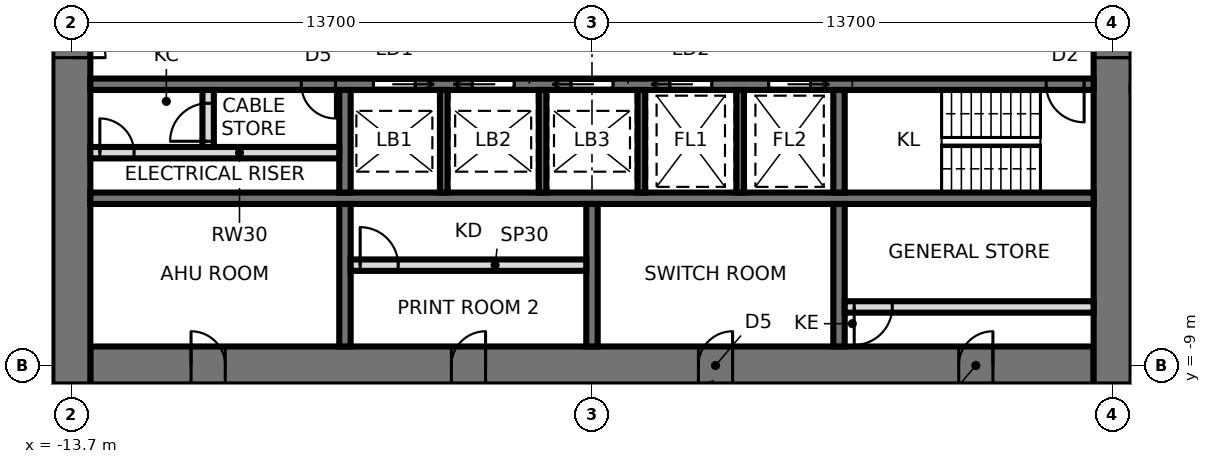
"""IFC4 building model, lengths in metres.
Left out: names, types, materials, properties, quantities, classifications, styles, units other than length and angle.
Written with IfcOpenShell. Run it as: python <this file> out.ifc"""

import sys

from ifc_helpers import new_model, si_unit, direction, frame, frame_2d, origin, place, context, subcontext, project, spatial, rectangle, extrude, element, fill, save


model = new_model("IFC4")
c1 = context("Model", 3, precision=1e-05, world=origin(), true_north=direction((0.0, 1.0)))
c2 = subcontext(c1, "Body", "Model", "MODEL_VIEW")
j1 = project(units=[si_unit("LENGTHUNIT", "METRE"), si_unit("PLANEANGLEUNIT", "RADIAN")], contexts=[c1])
p1 = place(None, origin())
s1 = spatial("IfcSite", under=j1, at=p1, CompositionType="ELEMENT")
p2 = place(p1, origin())
s2 = spatial("IfcBuilding", under=s1, at=p2, CompositionType="ELEMENT")
p3 = place(p2, frame((0.0, 0.0, 96.3)))
s3 = spatial("IfcBuildingStorey", under=s2, at=p3, CompositionType="ELEMENT", Elevation=96.3)
p4 = place(p3, frame((-13.2, -9.0, 0.0), z_axis=(0.0, 0.0, 1.0), x_axis=(1.0, 0.0, 0.0)))
e1 = element("IfcWall", 1, at=p4, inside=s3, PredefinedType="SHEAR", context=c2, shape_type="SweptSolid", body=[
    extrude(rectangle(XDim=26.4, YDim=1.0, at=frame_2d((13.2, 0.0))), origin(), (0.0, 0.0, 1.0), 3.9),
])
p5 = place(p4, frame((2.65, 0.0, 0.0)))
e2 = element("IfcOpeningElement", 2, at=p5, cuts=e1, PredefinedType="OPENING", context=c2, shape_type="SweptSolid", body=[
    extrude(rectangle(XDim=0.9, YDim=2.1, at=frame_2d((0.45, 1.05))), frame((0.0, 0.51, 0.0), z_axis=(0.0, -1.0, 0.0), x_axis=(1.0, 0.0, 0.0)), (0.0, 0.0, 1.0), 1.02),
])
p6 = place(p4, frame((9.5, 0.0, 0.0)))
e3 = element("IfcOpeningElement", 3, at=p6, cuts=e1, PredefinedType="OPENING", context=c2, shape_type="SweptSolid", body=[
    extrude(rectangle(XDim=0.9, YDim=2.1, at=frame_2d((0.45, 1.05))), frame((0.0, 0.51, 0.0), z_axis=(0.0, -1.0, 0.0), x_axis=(1.0, 0.0, 0.0)), (0.0, 0.0, 1.0), 1.02),
])
p7 = place(p4, frame((16.0, 0.0, 0.0)))
e4 = element("IfcOpeningElement", 4, at=p7, cuts=e1, PredefinedType="OPENING", context=c2, shape_type="SweptSolid", body=[
    extrude(rectangle(XDim=0.9, YDim=2.1, at=frame_2d((0.45, 1.05))), frame((0.0, 0.51, 0.0), z_axis=(0.0, -1.0, 0.0), x_axis=(1.0, 0.0, 0.0)), (0.0, 0.0, 1.0), 1.02),
])
p8 = place(p4, frame((22.85, 0.0, 0.0)))
e5 = element("IfcOpeningElement", 5, at=p8, cuts=e1, PredefinedType="OPENING", context=c2, shape_type="SweptSolid", body=[
    extrude(rectangle(XDim=0.9, YDim=2.1, at=frame_2d((0.45, 1.05))), frame((0.0, 0.51, 0.0), z_axis=(0.0, -1.0, 0.0), x_axis=(1.0, 0.0, 0.0)), (0.0, 0.0, 1.0), 1.02),
])
p9 = place(p3, frame((13.7, -9.5, 0.0), z_axis=(0.0, 0.0, 1.0), x_axis=(0.0, 1.0, 0.0)))
e6 = element("IfcWall", 6, at=p9, inside=s3, PredefinedType="SHEAR", context=c2, shape_type="SweptSolid", body=[
    extrude(rectangle(XDim=19.0, YDim=1.0, at=frame_2d((9.5, 0.0))), origin(), (0.0, 0.0, 1.0), 3.9),
])
p10 = place(p9, frame((8.6, 0.0, 0.0)))
e7 = element("IfcOpeningElement", 7, at=p10, cuts=e6, PredefinedType="OPENING", context=c2, shape_type="SweptSolid", body=[
    extrude(rectangle(XDim=1.8, YDim=2.4, at=frame_2d((0.9, 1.2))), frame((0.0, 0.51, 0.0), z_axis=(0.0, -1.0, 0.0), x_axis=(1.0, 0.0, 0.0)), (0.0, 0.0, 1.0), 1.02),
])
p11 = place(p3, frame((-13.7, 9.5, 0.0), z_axis=(0.0, 0.0, 1.0), x_axis=(0.0, -1.0, 0.0)))
e8 = element("IfcWall", 8, at=p11, inside=s3, PredefinedType="SHEAR", context=c2, shape_type="SweptSolid", body=[
    extrude(rectangle(XDim=19.0, YDim=1.0, at=frame_2d((9.5, 0.0))), origin(), (0.0, 0.0, 1.0), 3.9),
])
p12 = place(p11, frame((8.6, 0.0, 0.0)))
e9 = element("IfcOpeningElement", 9, at=p12, cuts=e8, PredefinedType="OPENING", context=c2, shape_type="SweptSolid", body=[
    extrude(rectangle(XDim=1.8, YDim=2.4, at=frame_2d((0.9, 1.2))), frame((0.0, 0.51, 0.0), z_axis=(0.0, -1.0, 0.0), x_axis=(1.0, 0.0, 0.0)), (0.0, 0.0, 1.0), 1.02),
])
p13 = place(p3, frame((-13.2, -1.6, 0.0), z_axis=(0.0, 0.0, 1.0), x_axis=(1.0, 0.0, 0.0)))
e10 = element("IfcWall", 10, at=p13, inside=s3, PredefinedType="SHEAR", context=c2, shape_type="SweptSolid", body=[
    extrude(rectangle(XDim=26.4, YDim=0.3, at=frame_2d((13.2, 0.0))), origin(), (0.0, 0.0, 1.0), 3.9),
])
p14 = place(p13, frame((25.15, 0.0, 0.0)))
e11 = element("IfcOpeningElement", 11, at=p14, cuts=e10, PredefinedType="OPENING", context=c2, shape_type="SweptSolid", body=[
    extrude(rectangle(XDim=1.0, YDim=2.1, at=frame_2d((0.5, 1.05))), frame((0.0, 0.16, 0.0), z_axis=(0.0, -1.0, 0.0), x_axis=(1.0, 0.0, 0.0)), (0.0, 0.0, 1.0), 0.32),
])
p15 = place(p13, frame((7.45, 0.0, 0.0)))
e12 = element("IfcOpeningElement", 12, at=p15, cuts=e10, PredefinedType="OPENING", context=c2, shape_type="SweptSolid", body=[
    extrude(rectangle(XDim=1.1, YDim=2.3, at=frame_2d((0.55, 1.15))), frame((0.0, 0.16, 0.0), z_axis=(0.0, -1.0, 0.0), x_axis=(1.0, 0.0, 0.0)), (0.0, 0.0, 1.0), 0.32),
])
p16 = place(p13, frame((10.05, 0.0, 0.0)))
e13 = element("IfcOpeningElement", 13, at=p16, cuts=e10, PredefinedType="OPENING", context=c2, shape_type="SweptSolid", body=[
    extrude(rectangle(XDim=1.1, YDim=2.3, at=frame_2d((0.55, 1.15))), frame((0.0, 0.16, 0.0), z_axis=(0.0, -1.0, 0.0), x_axis=(1.0, 0.0, 0.0)), (0.0, 0.0, 1.0), 0.32),
])
p17 = place(p13, frame((12.65, 0.0, 0.0)))
e14 = element("IfcOpeningElement", 14, at=p17, cuts=e10, PredefinedType="OPENING", context=c2, shape_type="SweptSolid", body=[
    extrude(rectangle(XDim=1.1, YDim=2.3, at=frame_2d((0.55, 1.15))), frame((0.0, 0.16, 0.0), z_axis=(0.0, -1.0, 0.0), x_axis=(1.0, 0.0, 0.0)), (0.0, 0.0, 1.0), 0.32),
])
p18 = place(p13, frame((15.25, 0.0, 0.0)))
e15 = element("IfcOpeningElement", 15, at=p18, cuts=e10, PredefinedType="OPENING", context=c2, shape_type="SweptSolid", body=[
    extrude(rectangle(XDim=1.1, YDim=2.3, at=frame_2d((0.55, 1.15))), frame((0.0, 0.16, 0.0), z_axis=(0.0, -1.0, 0.0), x_axis=(1.0, 0.0, 0.0)), (0.0, 0.0, 1.0), 0.32),
])
p19 = place(p13, frame((17.85, 0.0, 0.0)))
e16 = element("IfcOpeningElement", 16, at=p19, cuts=e10, PredefinedType="OPENING", context=c2, shape_type="SweptSolid", body=[
    extrude(rectangle(XDim=1.1, YDim=2.3, at=frame_2d((0.55, 1.15))), frame((0.0, 0.16, 0.0), z_axis=(0.0, -1.0, 0.0), x_axis=(1.0, 0.0, 0.0)), (0.0, 0.0, 1.0), 0.32),
])
p20 = place(p13, frame((5.55, 0.0, 0.0)))
e17 = element("IfcOpeningElement", 17, at=p20, cuts=e10, PredefinedType="OPENING", context=c2, shape_type="SweptSolid", body=[
    extrude(rectangle(XDim=0.9, YDim=2.1, at=frame_2d((0.45, 1.05))), frame((0.0, 0.16, 0.0), z_axis=(0.0, -1.0, 0.0), x_axis=(1.0, 0.0, 0.0)), (0.0, 0.0, 1.0), 0.32),
])
p21 = place(p3, frame((-13.2, -4.6, 0.0), z_axis=(0.0, 0.0, 1.0), x_axis=(1.0, 0.0, 0.0)))
e18 = element("IfcWall", 18, at=p21, inside=s3, PredefinedType="SHEAR", context=c2, shape_type="SweptSolid", body=[
    extrude(rectangle(XDim=26.4, YDim=0.3, at=frame_2d((13.2, 0.0))), origin(), (0.0, 0.0, 1.0), 3.9),
])
p22 = place(p3, frame((-6.5, -1.75, 0.0), z_axis=(0.0, 0.0, 1.0), x_axis=(0.0, -1.0, 0.0)))
e19 = element("IfcWall", 19, at=p22, inside=s3, PredefinedType="SHEAR", context=c2, shape_type="SweptSolid", body=[
    extrude(rectangle(XDim=2.7, YDim=0.3, at=frame_2d((1.35, 0.0))), origin(), (0.0, 0.0, 1.0), 3.9),
])
p23 = place(p3, frame((-6.5, -4.75, 0.0), z_axis=(0.0, 0.0, 1.0), x_axis=(0.0, -1.0, 0.0)))
e20 = element("IfcWall", 20, at=p23, inside=s3, PredefinedType="SHEAR", context=c2, shape_type="SweptSolid", body=[
    extrude(rectangle(XDim=3.75, YDim=0.3, at=frame_2d((1.875, 0.0))), origin(), (0.0, 0.0, 1.0), 3.9),
])
p24 = place(p3, frame((6.5, -1.75, 0.0), z_axis=(0.0, 0.0, 1.0), x_axis=(0.0, -1.0, 0.0)))
e21 = element("IfcWall", 21, at=p24, inside=s3, PredefinedType="SHEAR", context=c2, shape_type="SweptSolid", body=[
    extrude(rectangle(XDim=2.7, YDim=0.3, at=frame_2d((1.35, 0.0))), origin(), (0.0, 0.0, 1.0), 3.9),
])
p25 = place(p3, frame((6.5, -4.75, 0.0), z_axis=(0.0, 0.0, 1.0), x_axis=(0.0, -1.0, 0.0)))
e22 = element("IfcWall", 22, at=p25, inside=s3, PredefinedType="SHEAR", context=c2, shape_type="SweptSolid", body=[
    extrude(rectangle(XDim=3.75, YDim=0.3, at=frame_2d((1.875, 0.0))), origin(), (0.0, 0.0, 1.0), 3.9),
])
for number, where, z_axis, x_axis in (
    (23, (-3.9, -1.75, 0.0), (0.0, 0.0, 1.0), (0.0, -1.0, 0.0)),
    (24, (-1.3, -1.75, 0.0), (0.0, 0.0, 1.0), (0.0, -1.0, 0.0)),
    (25, (1.3, -1.75, 0.0), (0.0, 0.0, 1.0), (0.0, -1.0, 0.0)),
    (26, (3.9, -1.75, 0.0), (0.0, 0.0, 1.0), (0.0, -1.0, 0.0)),
):
    element("IfcWall", number, at=place(p3, frame(where, z_axis=z_axis, x_axis=x_axis)), inside=s3, PredefinedType="SHEAR", context=c2, shape_type="SweptSolid", body=[
        extrude(rectangle(XDim=2.7, YDim=0.2, at=frame_2d((1.35, 0.0))), origin(), (0.0, 0.0, 1.0), 3.9),
    ])
p26 = place(p3, frame((0.0, -4.75, 0.0), z_axis=(0.0, 0.0, 1.0), x_axis=(0.0, -1.0, 0.0)))
e27 = element("IfcWall", 27, at=p26, inside=s3, PredefinedType="SHEAR", context=c2, shape_type="SweptSolid", body=[
    extrude(rectangle(XDim=3.75, YDim=0.3, at=frame_2d((1.875, 0.0))), origin(), (0.0, 0.0, 1.0), 3.9),
])
p27 = place(p3, frame((-6.35, -6.36, 0.0), z_axis=(0.0, 0.0, 1.0), x_axis=(1.0, 0.0, 0.0)))
e28 = element("IfcWall", 28, at=p27, inside=s3, PredefinedType="PARTITIONING", context=c2, shape_type="SweptSolid", body=[
    extrude(rectangle(XDim=6.2, YDim=0.3, at=frame_2d((3.1, 0.0))), origin(), (0.0, 0.0, 1.0), 3.74),
])
p28 = place(p27, frame((0.25, 0.0, 0.0)))
e29 = element("IfcOpeningElement", 29, at=p28, cuts=e28, PredefinedType="OPENING", context=c2, shape_type="SweptSolid", body=[
    extrude(rectangle(XDim=1.0, YDim=2.4, at=frame_2d((0.5, 1.2))), frame((0.0, 0.16, 0.0), z_axis=(0.0, -1.0, 0.0), x_axis=(1.0, 0.0, 0.0)), (0.0, 0.0, 1.0), 0.32),
])
p29 = place(p3, frame((6.65, -7.46, 0.0), z_axis=(0.0, 0.0, 1.0), x_axis=(1.0, 0.0, 0.0)))
e30 = element("IfcWall", 30, at=p29, inside=s3, PredefinedType="PARTITIONING", context=c2, shape_type="SweptSolid", body=[
    extrude(rectangle(XDim=6.55, YDim=0.3, at=frame_2d((3.275, 0.0))), origin(), (0.0, 0.0, 1.0), 3.74),
])
p30 = place(p29, frame((0.25, 0.0, 0.0)))
e31 = element("IfcOpeningElement", 31, at=p30, cuts=e30, PredefinedType="OPENING", context=c2, shape_type="SweptSolid", body=[
    extrude(rectangle(XDim=1.0, YDim=2.4, at=frame_2d((0.5, 1.2))), frame((0.0, 0.16, 0.0), z_axis=(0.0, -1.0, 0.0), x_axis=(1.0, 0.0, 0.0)), (0.0, 0.0, 1.0), 0.32),
])
p31 = place(p3, frame((-13.2, -3.4, 0.0), z_axis=(0.0, 0.0, 1.0), x_axis=(1.0, 0.0, 0.0)))
e32 = element("IfcWall", 32, at=p31, inside=s3, PredefinedType="SOLIDWALL", context=c2, shape_type="SweptSolid", body=[
    extrude(rectangle(XDim=6.55, YDim=0.3, at=frame_2d((3.275, 0.0))), origin(), (0.0, 0.0, 1.0), 3.74),
])
p32 = place(p31, frame((0.25, 0.0, 0.0)))
e33 = element("IfcOpeningElement", 33, at=p32, cuts=e32, PredefinedType="OPENING", context=c2, shape_type="SweptSolid", body=[
    extrude(rectangle(XDim=0.9, YDim=2.1, at=frame_2d((0.45, 1.05))), frame((0.0, 0.16, 0.0), z_axis=(0.0, -1.0, 0.0), x_axis=(1.0, 0.0, 0.0)), (0.0, 0.0, 1.0), 0.32),
])
p33 = place(p3, frame((-10.1, -3.25, 0.0), z_axis=(0.0, 0.0, 1.0), x_axis=(0.0, 1.0, 0.0)))
e34 = element("IfcWall", 34, at=p33, inside=s3, PredefinedType="PARTITIONING", context=c2, shape_type="SweptSolid", body=[
    extrude(rectangle(XDim=1.5, YDim=0.3, at=frame_2d((0.75, 0.0))), origin(), (0.0, 0.0, 1.0), 3.74),
])
p34 = place(p33, frame((0.15, 0.0, 0.0)))
e35 = element("IfcOpeningElement", 35, at=p34, cuts=e34, PredefinedType="OPENING", context=c2, shape_type="SweptSolid", body=[
    extrude(rectangle(XDim=1.0, YDim=2.4, at=frame_2d((0.5, 1.2))), frame((0.0, 0.16, 0.0), z_axis=(0.0, -1.0, 0.0), x_axis=(1.0, 0.0, 0.0)), (0.0, 0.0, 1.0), 0.32),
])
p35 = place(p3, frame((3.672, -11.3, 0.0), z_axis=(0.0, 0.0, 1.0), x_axis=(-0.309059822154, 0.95104259964, 0.0)))
e36 = element("IfcWall", 36, at=p35, inside=s3, PredefinedType="PARTITIONING", context=c2, shape_type="SweptSolid", body=[
    extrude(rectangle(XDim=1.893, YDim=0.12, at=frame_2d((0.946, 0.0))), origin(), (0.0, 0.0, 1.0), 2.94),
])
p36 = place(p12, origin())
e37 = element("IfcDoor", 37, at=p36, inside=s3, OperationType="DOUBLE_DOOR_SINGLE_SWING", PredefinedType="DOOR", context=c2, shape_type="SweptSolid", body=[
    extrude(rectangle(XDim=1.72, YDim=2.36, at=frame_2d((0.9, 1.18))), frame((0.0, 0.025, 0.0), z_axis=(0.0, -1.0, 0.0), x_axis=(1.0, 0.0, 0.0)), (0.0, 0.0, 1.0), 0.05),
    extrude(rectangle(XDim=0.04, YDim=2.4, at=frame_2d((0.02, 1.2))), frame((0.0, 0.25, 0.0), z_axis=(0.0, -1.0, 0.0), x_axis=(1.0, 0.0, 0.0)), (0.0, 0.0, 1.0), 0.5),
    extrude(rectangle(XDim=0.04, YDim=2.4, at=frame_2d((1.78, 1.2))), frame((0.0, 0.25, 0.0), z_axis=(0.0, -1.0, 0.0), x_axis=(1.0, 0.0, 0.0)), (0.0, 0.0, 1.0), 0.5),
    extrude(rectangle(XDim=1.72, YDim=0.04, at=frame_2d((0.9, 2.38))), frame((0.0, 0.25, 0.0), z_axis=(0.0, -1.0, 0.0), x_axis=(1.0, 0.0, 0.0)), (0.0, 0.0, 1.0), 0.5),
])
fill(e9, e37)
p37 = place(p10, frame((1.8, 0.0, 0.0), z_axis=(0.0, 0.0, 1.0), x_axis=(-1.0, 0.0, 0.0)))
e38 = element("IfcDoor", 38, at=p37, inside=s3, OperationType="DOUBLE_DOOR_SINGLE_SWING", PredefinedType="DOOR", context=c2, shape_type="SweptSolid", body=[
    extrude(rectangle(XDim=1.72, YDim=2.36, at=frame_2d((0.9, 1.18))), frame((0.0, 0.025, 0.0), z_axis=(0.0, -1.0, 0.0), x_axis=(1.0, 0.0, 0.0)), (0.0, 0.0, 1.0), 0.05),
    extrude(rectangle(XDim=0.04, YDim=2.4, at=frame_2d((1.78, 1.2))), frame((0.0, 0.25, 0.0), z_axis=(0.0, -1.0, 0.0), x_axis=(1.0, 0.0, 0.0)), (0.0, 0.0, 1.0), 0.5),
    extrude(rectangle(XDim=0.04, YDim=2.4, at=frame_2d((0.02, 1.2))), frame((0.0, 0.25, 0.0), z_axis=(0.0, -1.0, 0.0), x_axis=(1.0, 0.0, 0.0)), (0.0, 0.0, 1.0), 0.5),
    extrude(rectangle(XDim=1.72, YDim=0.04, at=frame_2d((0.9, 2.38))), frame((0.0, 0.25, 0.0), z_axis=(0.0, -1.0, 0.0), x_axis=(1.0, 0.0, 0.0)), (0.0, 0.0, 1.0), 0.5),
])
fill(e7, e38)
p38 = place(p14, frame((1.0, 0.0, 0.0), z_axis=(0.0, 0.0, 1.0), x_axis=(-1.0, 0.0, 0.0)))
e39 = element("IfcDoor", 39, at=p38, inside=s3, OperationType="SINGLE_SWING_LEFT", PredefinedType="DOOR", context=c2, shape_type="SweptSolid", body=[
    extrude(rectangle(XDim=1.0, YDim=2.1, at=frame_2d((0.5, 1.05))), frame((0.0, 0.025, 0.0), z_axis=(0.0, -1.0, 0.0), x_axis=(1.0, 0.0, 0.0)), (0.0, 0.0, 1.0), 0.05),
])
fill(e11, e39)
p39 = place(p15, frame((1.1, 0.0, 0.0), z_axis=(0.0, 0.0, 1.0), x_axis=(-1.0, 0.0, 0.0)))
e40 = element("IfcDoor", 40, at=p39, inside=s3, OperationType="SLIDING_TO_LEFT", PredefinedType="DOOR", context=c2, shape_type="SweptSolid", body=[
    extrude(rectangle(XDim=1.1, YDim=2.3, at=frame_2d((0.55, 1.15))), frame((0.0, 0.025, 0.0), z_axis=(0.0, -1.0, 0.0), x_axis=(1.0, 0.0, 0.0)), (0.0, 0.0, 1.0), 0.05),
])
fill(e12, e40)
p40 = place(p16, frame((1.1, 0.0, 0.0), z_axis=(0.0, 0.0, 1.0), x_axis=(-1.0, 0.0, 0.0)))
e41 = element("IfcDoor", 41, at=p40, inside=s3, OperationType="SLIDING_TO_RIGHT", PredefinedType="DOOR", context=c2, shape_type="SweptSolid", body=[
    extrude(rectangle(XDim=1.1, YDim=2.3, at=frame_2d((0.55, 1.15))), frame((0.0, 0.025, 0.0), z_axis=(0.0, -1.0, 0.0), x_axis=(1.0, 0.0, 0.0)), (0.0, 0.0, 1.0), 0.05),
])
fill(e13, e41)
p41 = place(p17, frame((1.1, 0.0, 0.0), z_axis=(0.0, 0.0, 1.0), x_axis=(-1.0, 0.0, 0.0)))
e42 = element("IfcDoor", 42, at=p41, inside=s3, OperationType="SLIDING_TO_RIGHT", PredefinedType="DOOR", context=c2, shape_type="SweptSolid", body=[
    extrude(rectangle(XDim=1.1, YDim=2.3, at=frame_2d((0.55, 1.15))), frame((0.0, 0.025, 0.0), z_axis=(0.0, -1.0, 0.0), x_axis=(1.0, 0.0, 0.0)), (0.0, 0.0, 1.0), 0.05),
])
fill(e14, e42)
p42 = place(p18, frame((1.1, 0.0, 0.0), z_axis=(0.0, 0.0, 1.0), x_axis=(-1.0, 0.0, 0.0)))
e43 = element("IfcDoor", 43, at=p42, inside=s3, OperationType="SLIDING_TO_RIGHT", PredefinedType="DOOR", context=c2, shape_type="SweptSolid", body=[
    extrude(rectangle(XDim=1.1, YDim=2.3, at=frame_2d((0.55, 1.15))), frame((0.0, 0.025, 0.0), z_axis=(0.0, -1.0, 0.0), x_axis=(1.0, 0.0, 0.0)), (0.0, 0.0, 1.0), 0.05),
])
fill(e15, e43)
p43 = place(p19, frame((1.1, 0.0, 0.0), z_axis=(0.0, 0.0, 1.0), x_axis=(-1.0, 0.0, 0.0)))
e44 = element("IfcDoor", 44, at=p43, inside=s3, OperationType="SLIDING_TO_LEFT", PredefinedType="DOOR", context=c2, shape_type="SweptSolid", body=[
    extrude(rectangle(XDim=1.1, YDim=2.3, at=frame_2d((0.55, 1.15))), frame((0.0, 0.025, 0.0), z_axis=(0.0, -1.0, 0.0), x_axis=(1.0, 0.0, 0.0)), (0.0, 0.0, 1.0), 0.05),
])
fill(e16, e44)
p44 = place(p20, frame((0.9, 0.0, 0.0), z_axis=(0.0, 0.0, 1.0), x_axis=(-1.0, 0.0, 0.0)))
e45 = element("IfcDoor", 45, at=p44, inside=s3, OperationType="SINGLE_SWING_LEFT", PredefinedType="DOOR", context=c2, shape_type="SweptSolid", body=[
    extrude(rectangle(XDim=0.9, YDim=2.1, at=frame_2d((0.45, 1.05))), frame((0.0, 0.025, 0.0), z_axis=(0.0, -1.0, 0.0), x_axis=(1.0, 0.0, 0.0)), (0.0, 0.0, 1.0), 0.05),
])
fill(e17, e45)
p45 = place(p5, origin())
e46 = element("IfcDoor", 46, at=p45, inside=s3, OperationType="SINGLE_SWING_LEFT", PredefinedType="DOOR", context=c2, shape_type="SweptSolid", body=[
    extrude(rectangle(XDim=0.82, YDim=2.06, at=frame_2d((0.45, 1.03))), frame((0.0, 0.025, 0.0), z_axis=(0.0, -1.0, 0.0), x_axis=(1.0, 0.0, 0.0)), (0.0, 0.0, 1.0), 0.05),
    extrude(rectangle(XDim=0.04, YDim=2.1, at=frame_2d((0.02, 1.05))), frame((0.0, 0.25, 0.0), z_axis=(0.0, -1.0, 0.0), x_axis=(1.0, 0.0, 0.0)), (0.0, 0.0, 1.0), 0.5),
    extrude(rectangle(XDim=0.04, YDim=2.1, at=frame_2d((0.88, 1.05))), frame((0.0, 0.25, 0.0), z_axis=(0.0, -1.0, 0.0), x_axis=(1.0, 0.0, 0.0)), (0.0, 0.0, 1.0), 0.5),
    extrude(rectangle(XDim=0.82, YDim=0.04, at=frame_2d((0.45, 2.08))), frame((0.0, 0.25, 0.0), z_axis=(0.0, -1.0, 0.0), x_axis=(1.0, 0.0, 0.0)), (0.0, 0.0, 1.0), 0.5),
])
fill(e2, e46)
p46 = place(p6, origin())
e47 = element("IfcDoor", 47, at=p46, inside=s3, OperationType="SINGLE_SWING_RIGHT", PredefinedType="DOOR", context=c2, shape_type="SweptSolid", body=[
    extrude(rectangle(XDim=0.82, YDim=2.06, at=frame_2d((0.45, 1.03))), frame((0.0, 0.025, 0.0), z_axis=(0.0, -1.0, 0.0), x_axis=(1.0, 0.0, 0.0)), (0.0, 0.0, 1.0), 0.05),
    extrude(rectangle(XDim=0.04, YDim=2.1, at=frame_2d((0.02, 1.05))), frame((0.0, 0.25, 0.0), z_axis=(0.0, -1.0, 0.0), x_axis=(1.0, 0.0, 0.0)), (0.0, 0.0, 1.0), 0.5),
    extrude(rectangle(XDim=0.04, YDim=2.1, at=frame_2d((0.88, 1.05))), frame((0.0, 0.25, 0.0), z_axis=(0.0, -1.0, 0.0), x_axis=(1.0, 0.0, 0.0)), (0.0, 0.0, 1.0), 0.5),
    extrude(rectangle(XDim=0.82, YDim=0.04, at=frame_2d((0.45, 2.08))), frame((0.0, 0.25, 0.0), z_axis=(0.0, -1.0, 0.0), x_axis=(1.0, 0.0, 0.0)), (0.0, 0.0, 1.0), 0.5),
])
fill(e3, e47)
p47 = place(p7, origin())
e48 = element("IfcDoor", 48, at=p47, inside=s3, OperationType="SINGLE_SWING_RIGHT", PredefinedType="DOOR", context=c2, shape_type="SweptSolid", body=[
    extrude(rectangle(XDim=0.82, YDim=2.06, at=frame_2d((0.45, 1.03))), frame((0.0, 0.025, 0.0), z_axis=(0.0, -1.0, 0.0), x_axis=(1.0, 0.0, 0.0)), (0.0, 0.0, 1.0), 0.05),
    extrude(rectangle(XDim=0.04, YDim=2.1, at=frame_2d((0.02, 1.05))), frame((0.0, 0.25, 0.0), z_axis=(0.0, -1.0, 0.0), x_axis=(1.0, 0.0, 0.0)), (0.0, 0.0, 1.0), 0.5),
    extrude(rectangle(XDim=0.04, YDim=2.1, at=frame_2d((0.88, 1.05))), frame((0.0, 0.25, 0.0), z_axis=(0.0, -1.0, 0.0), x_axis=(1.0, 0.0, 0.0)), (0.0, 0.0, 1.0), 0.5),
    extrude(rectangle(XDim=0.82, YDim=0.04, at=frame_2d((0.45, 2.08))), frame((0.0, 0.25, 0.0), z_axis=(0.0, -1.0, 0.0), x_axis=(1.0, 0.0, 0.0)), (0.0, 0.0, 1.0), 0.5),
])
fill(e4, e48)
p48 = place(p8, origin())
e49 = element("IfcDoor", 49, at=p48, inside=s3, OperationType="SINGLE_SWING_RIGHT", PredefinedType="DOOR", context=c2, shape_type="SweptSolid", body=[
    extrude(rectangle(XDim=0.82, YDim=2.06, at=frame_2d((0.45, 1.03))), frame((0.0, 0.025, 0.0), z_axis=(0.0, -1.0, 0.0), x_axis=(1.0, 0.0, 0.0)), (0.0, 0.0, 1.0), 0.05),
    extrude(rectangle(XDim=0.04, YDim=2.1, at=frame_2d((0.02, 1.05))), frame((0.0, 0.25, 0.0), z_axis=(0.0, -1.0, 0.0), x_axis=(1.0, 0.0, 0.0)), (0.0, 0.0, 1.0), 0.5),
    extrude(rectangle(XDim=0.04, YDim=2.1, at=frame_2d((0.88, 1.05))), frame((0.0, 0.25, 0.0), z_axis=(0.0, -1.0, 0.0), x_axis=(1.0, 0.0, 0.0)), (0.0, 0.0, 1.0), 0.5),
    extrude(rectangle(XDim=0.82, YDim=0.04, at=frame_2d((0.45, 2.08))), frame((0.0, 0.25, 0.0), z_axis=(0.0, -1.0, 0.0), x_axis=(1.0, 0.0, 0.0)), (0.0, 0.0, 1.0), 0.5),
])
fill(e5, e49)
p49 = place(p28, origin())
e50 = element("IfcDoor", 50, at=p49, inside=s3, OperationType="SINGLE_SWING_LEFT", PredefinedType="DOOR", context=c2, shape_type="SweptSolid", body=[
    extrude(rectangle(XDim=1.0, YDim=2.4, at=frame_2d((0.5, 1.2))), frame((0.0, 0.025, 0.0), z_axis=(0.0, -1.0, 0.0), x_axis=(1.0, 0.0, 0.0)), (0.0, 0.0, 1.0), 0.05),
])
fill(e29, e50)
p50 = place(p30, frame((1.0, 0.0, 0.0), z_axis=(0.0, 0.0, 1.0), x_axis=(-1.0, 0.0, 0.0)))
e51 = element("IfcDoor", 51, at=p50, inside=s3, OperationType="SINGLE_SWING_RIGHT", PredefinedType="DOOR", context=c2, shape_type="SweptSolid", body=[
    extrude(rectangle(XDim=1.0, YDim=2.4, at=frame_2d((0.5, 1.2))), frame((0.0, 0.025, 0.0), z_axis=(0.0, -1.0, 0.0), x_axis=(1.0, 0.0, 0.0)), (0.0, 0.0, 1.0), 0.05),
])
fill(e31, e51)
p51 = place(p32, origin())
e52 = element("IfcDoor", 52, at=p51, inside=s3, OperationType="SINGLE_SWING_LEFT", PredefinedType="DOOR", context=c2, shape_type="SweptSolid", body=[
    extrude(rectangle(XDim=0.9, YDim=2.1, at=frame_2d((0.45, 1.05))), frame((0.0, 0.025, 0.0), z_axis=(0.0, -1.0, 0.0), x_axis=(1.0, 0.0, 0.0)), (0.0, 0.0, 1.0), 0.05),
])
fill(e33, e52)
p52 = place(p34, origin())
e53 = element("IfcDoor", 53, at=p52, inside=s3, OperationType="SINGLE_SWING_LEFT", PredefinedType="DOOR", context=c2, shape_type="SweptSolid", body=[
    extrude(rectangle(XDim=1.0, YDim=2.4, at=frame_2d((0.5, 1.2))), frame((0.0, 0.025, 0.0), z_axis=(0.0, -1.0, 0.0), x_axis=(1.0, 0.0, 0.0)), (0.0, 0.0, 1.0), 0.05),
])
fill(e35, e53)
save(model, sys.argv[1])
